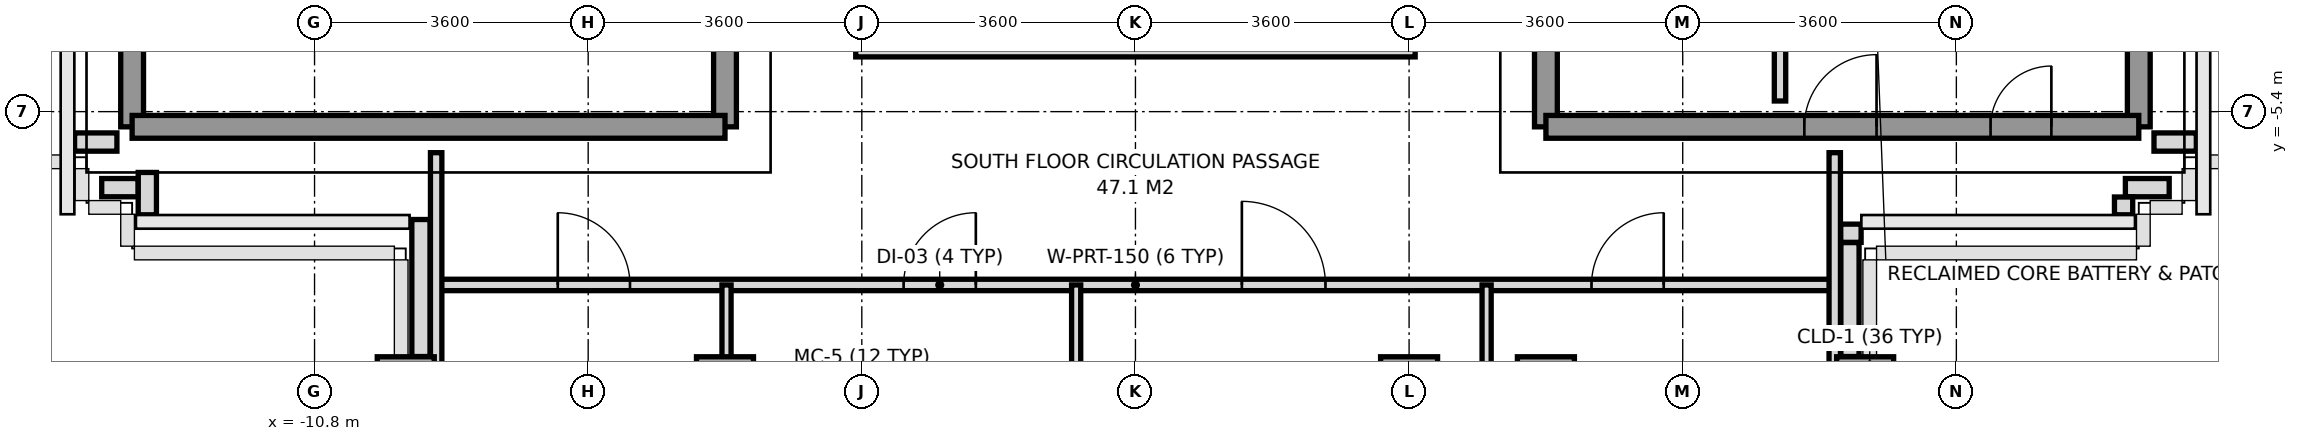
"""IFC4 building model, lengths in metres.
Left out: names, types, materials, properties, quantities, classifications, styles, units other than length and angle.
Written with IfcOpenShell. Run it as: python <this file> out.ifc"""

import sys

from ifc_helpers import new_model, si_unit, direction, frame, frame_2d, origin, origin_2d, place, context, subcontext, project, spatial, rectangle, extrude, source, transform, mapped, element, fill, save


model = new_model("IFC4")
c1 = context("Model", 3, precision=1e-05, world=origin(), true_north=direction((0.0, 1.0)))
c2 = subcontext(c1, "Body", "Model", "MODEL_VIEW")
j1 = project(units=[si_unit("LENGTHUNIT", "METRE"), si_unit("PLANEANGLEUNIT", "RADIAN")], contexts=[c1])
p1 = place(None, origin())
s1 = spatial("IfcSite", under=j1, at=p1, CompositionType="ELEMENT")
p2 = place(p1, origin())
s2 = spatial("IfcBuilding", under=s1, at=p2, CompositionType="ELEMENT")
p3 = place(p2, frame((0.0, 0.0, 265.2)))
s3 = spatial("IfcBuildingStorey", under=s2, at=p3, CompositionType="ELEMENT", Elevation=265.2)
m1 = source(origin(), c2, "Body", "SweptSolid", [
    extrude(rectangle(XDim=0.75, YDim=0.75, at=origin_2d()), origin(), (0.0, 0.0, 1.0), 3.01),
])
for number, where, z_axis, x_axis in (
    (1, (-9.6, -9.0, 0.0), (0.0, 0.0, 1.0), (1.0, 0.0, 0.0)),
    (2, (-5.4, -9.0, 0.0), (0.0, 0.0, 1.0), (1.0, 0.0, 0.0)),
    (3, (-3.6, -9.0, 0.0), (0.0, 0.0, 1.0), (1.0, 0.0, 0.0)),
    (4, (3.6, -9.0, 0.0), (0.0, 0.0, 1.0), (1.0, 0.0, 0.0)),
    (5, (5.4, -9.0, 0.0), (0.0, 0.0, 1.0), (1.0, 0.0, 0.0)),
    (6, (9.6, -9.0, 0.0), (0.0, 0.0, 1.0), (1.0, 0.0, 0.0)),
):
    element("IfcColumn", number, at=place(p3, frame(where, z_axis=z_axis, x_axis=x_axis)), inside=s3, PredefinedType="COLUMN", context=c2, shape_type="MappedRepresentation", body=[
        mapped(m1, transform((0.0, 0.0, 0.0), x_axis=(1.0, 0.0, 0.0), y_axis=(0.0, 1.0, 0.0), z_axis=(0.0, 0.0, 1.0), scale=1.0)),
    ])
p4 = place(p3, frame((13.957, -5.8, 0.0), z_axis=(0.0, 0.0, 1.0), x_axis=(-1.0, 0.0, 0.0)))
e7 = element("IfcWall", 7, at=p4, inside=s3, PredefinedType="PARAPET", context=c2, shape_type="SweptSolid", body=[
    extrude(rectangle(XDim=0.557, YDim=0.24, at=frame_2d((0.279, 0.0))), origin(), (0.0, 0.0, 1.0), 1.15),
])
p5 = place(p3, frame((13.6, -6.4, 0.0), z_axis=(0.0, 0.0, 1.0), x_axis=(-1.0, 0.0, 0.0)))
e8 = element("IfcWall", 8, at=p5, inside=s3, PredefinedType="PARAPET", context=c2, shape_type="SweptSolid", body=[
    extrude(rectangle(XDim=0.576, YDim=0.24, at=frame_2d((0.288, 0.0))), origin(), (0.0, 0.0, 1.0), 1.15),
])
p6 = place(p3, frame((13.0, -6.523, 0.0), z_axis=(0.0, 0.0, 1.0), x_axis=(0.0, -1.0, 0.0)))
e9 = element("IfcWall", 9, at=p6, inside=s3, PredefinedType="PARAPET", context=c2, shape_type="SweptSolid", body=[
    extrude(rectangle(XDim=0.234, YDim=0.24, at=frame_2d((0.117, 0.0))), origin(), (0.0, 0.0, 1.0), 1.15),
])
p7 = place(p3, frame((9.547, -7.0, 0.0), z_axis=(0.0, 0.0, 1.0), x_axis=(-1.0, 0.0, 0.0)))
e10 = element("IfcWall", 10, at=p7, inside=s3, PredefinedType="PARAPET", context=c2, shape_type="SweptSolid", body=[
    extrude(rectangle(XDim=0.269, YDim=0.24, at=frame_2d((0.135, 0.0))), origin(), (0.0, 0.0, 1.0), 1.15),
])
p8 = place(p3, frame((9.4, -7.123, 0.0), z_axis=(0.0, 0.0, 1.0), x_axis=(0.0, -1.0, 0.0)))
e11 = element("IfcWall", 11, at=p8, inside=s3, PredefinedType="PARAPET", context=c2, shape_type="SweptSolid", body=[
    extrude(rectangle(XDim=1.499, YDim=0.24, at=frame_2d((0.75, 0.0))), origin(), (0.0, 0.0, 1.0), 1.15),
])
p9 = place(p3, frame((-9.4, -8.622, 0.0), z_axis=(0.0, 0.0, 1.0), x_axis=(0.0, 1.0, 0.0)))
e12 = element("IfcWall", 12, at=p9, inside=s3, PredefinedType="PARAPET", context=c2, shape_type="SweptSolid", body=[
    extrude(rectangle(XDim=1.803, YDim=0.24, at=frame_2d((0.901, 0.0))), origin(), (0.0, 0.0, 1.0), 1.15),
])
p10 = place(p3, frame((-13.0, -6.757, 0.0), z_axis=(0.0, 0.0, 1.0), x_axis=(0.0, 1.0, 0.0)))
e13 = element("IfcWall", 13, at=p10, inside=s3, PredefinedType="PARAPET", context=c2, shape_type="SweptSolid", body=[
    extrude(rectangle(XDim=0.557, YDim=0.24, at=frame_2d((0.279, 0.0))), origin(), (0.0, 0.0, 1.0), 1.15),
])
p11 = place(p3, frame((-13.123, -6.4, 0.0), z_axis=(0.0, 0.0, 1.0), x_axis=(-1.0, 0.0, 0.0)))
e14 = element("IfcWall", 14, at=p11, inside=s3, PredefinedType="PARAPET", context=c2, shape_type="SweptSolid", body=[
    extrude(rectangle(XDim=0.477, YDim=0.24, at=frame_2d((0.239, 0.0))), origin(), (0.0, 0.0, 1.0), 1.15),
])
p12 = place(p3, frame((-13.4, -5.8, 0.0), z_axis=(0.0, 0.0, 1.0), x_axis=(-1.0, 0.0, 0.0)))
e15 = element("IfcWall", 15, at=p12, inside=s3, PredefinedType="PARAPET", context=c2, shape_type="SweptSolid", body=[
    extrude(rectangle(XDim=0.557, YDim=0.24, at=frame_2d((0.279, 0.0))), origin(), (0.0, 0.0, 1.0), 1.15),
])
p13 = place(p3, frame((-13.2, -5.6, 0.0), z_axis=(0.0, 0.0, 1.0), x_axis=(0.0, 1.0, 0.0)))
e16 = element("IfcWall", 16, at=p13, inside=s3, PredefinedType="SHEAR", context=c2, shape_type="SweptSolid", body=[
    extrude(rectangle(XDim=11.2, YDim=0.3, at=frame_2d((5.6, 0.0))), origin(), (0.0, 0.0, 1.0), 3.01),
])
p14 = place(p3, frame((-5.4, -5.6, 0.0), z_axis=(0.0, 0.0, 1.0), x_axis=(0.0, 1.0, 0.0)))
e17 = element("IfcWall", 17, at=p14, inside=s3, PredefinedType="SHEAR", context=c2, shape_type="SweptSolid", body=[
    extrude(rectangle(XDim=12.5, YDim=0.3, at=frame_2d((6.25, 0.0))), origin(), (0.0, 0.0, 1.0), 3.01),
])
p15 = place(p14, frame((4.55, 0.0, 0.0)))
e18 = element("IfcOpeningElement", 18, at=p15, cuts=e17, PredefinedType="OPENING", context=c2, shape_type="SweptSolid", body=[
    extrude(rectangle(XDim=1.2, YDim=2.2, at=frame_2d((0.6, 1.1))), frame((0.0, 0.16, 0.0), z_axis=(0.0, -1.0, 0.0), x_axis=(1.0, 0.0, 0.0)), (0.0, 0.0, 1.0), 0.32),
])
p16 = place(p14, frame((10.45, 0.0, 0.0)))
e19 = element("IfcOpeningElement", 19, at=p16, cuts=e17, PredefinedType="OPENING", context=c2, shape_type="SweptSolid", body=[
    extrude(rectangle(XDim=1.2, YDim=2.2, at=frame_2d((0.6, 1.1))), frame((0.0, 0.16, 0.0), z_axis=(0.0, -1.0, 0.0), x_axis=(1.0, 0.0, 0.0)), (0.0, 0.0, 1.0), 0.32),
])
p17 = place(p3, frame((-13.2, -5.6, 0.0), z_axis=(0.0, 0.0, 1.0), x_axis=(1.0, 0.0, 0.0)))
e20 = element("IfcWall", 20, at=p17, inside=s3, PredefinedType="SHEAR", context=c2, shape_type="SweptSolid", body=[
    extrude(rectangle(XDim=7.8, YDim=0.3, at=frame_2d((3.9, 0.0))), origin(), (0.0, 0.0, 1.0), 3.01),
])
p18 = place(p3, frame((13.2, -5.6, 0.0), z_axis=(0.0, 0.0, 1.0), x_axis=(0.0, 1.0, 0.0)))
e21 = element("IfcWall", 21, at=p18, inside=s3, PredefinedType="SHEAR", context=c2, shape_type="SweptSolid", body=[
    extrude(rectangle(XDim=11.2, YDim=0.3, at=frame_2d((5.6, 0.0))), origin(), (0.0, 0.0, 1.0), 3.01),
])
p19 = place(p3, frame((5.4, -5.6, 0.0), z_axis=(0.0, 0.0, 1.0), x_axis=(0.0, 1.0, 0.0)))
e22 = element("IfcWall", 22, at=p19, inside=s3, PredefinedType="SHEAR", context=c2, shape_type="SweptSolid", body=[
    extrude(rectangle(XDim=12.5, YDim=0.3, at=frame_2d((6.25, 0.0))), origin(), (0.0, 0.0, 1.0), 3.01),
])
p20 = place(p19, frame((4.55, 0.0, 0.0)))
e23 = element("IfcOpeningElement", 23, at=p20, cuts=e22, PredefinedType="OPENING", context=c2, shape_type="SweptSolid", body=[
    extrude(rectangle(XDim=1.2, YDim=2.2, at=frame_2d((0.6, 1.1))), frame((0.0, 0.16, 0.0), z_axis=(0.0, -1.0, 0.0), x_axis=(1.0, 0.0, 0.0)), (0.0, 0.0, 1.0), 0.32),
])
p21 = place(p19, frame((10.45, 0.0, 0.0)))
e24 = element("IfcOpeningElement", 24, at=p21, cuts=e22, PredefinedType="OPENING", context=c2, shape_type="SweptSolid", body=[
    extrude(rectangle(XDim=1.2, YDim=2.2, at=frame_2d((0.6, 1.1))), frame((0.0, 0.16, 0.0), z_axis=(0.0, -1.0, 0.0), x_axis=(1.0, 0.0, 0.0)), (0.0, 0.0, 1.0), 0.32),
])
p22 = place(p19, frame((7.88, 0.0, 0.0)))
e25 = element("IfcOpeningElement", 25, at=p22, cuts=e22, PredefinedType="OPENING", context=c2, shape_type="SweptSolid", body=[
    extrude(rectangle(XDim=0.8, YDim=2.1, at=frame_2d((0.4, 1.05))), frame((0.0, 0.16, 0.0), z_axis=(0.0, -1.0, 0.0), x_axis=(1.0, 0.0, 0.0)), (0.0, 0.0, 1.0), 0.32),
])
p23 = place(p3, frame((5.4, -5.6, 0.0), z_axis=(0.0, 0.0, 1.0), x_axis=(1.0, 0.0, 0.0)))
e26 = element("IfcWall", 26, at=p23, inside=s3, PredefinedType="SHEAR", context=c2, shape_type="SweptSolid", body=[
    extrude(rectangle(XDim=7.8, YDim=0.3, at=frame_2d((3.9, 0.0))), origin(), (0.0, 0.0, 1.0), 3.01),
])
p24 = place(p23, frame((5.85, 0.0, 0.0)))
e27 = element("IfcOpeningElement", 27, at=p24, cuts=e26, PredefinedType="OPENING", context=c2, shape_type="SweptSolid", body=[
    extrude(rectangle(XDim=0.8, YDim=2.1, at=frame_2d((0.4, 1.05))), frame((0.0, 0.16, 0.0), z_axis=(0.0, -1.0, 0.0), x_axis=(1.0, 0.0, 0.0)), (0.0, 0.0, 1.0), 0.32),
])
p25 = place(p23, frame((3.4, 0.0, 0.0)))
e28 = element("IfcOpeningElement", 28, at=p25, cuts=e26, PredefinedType="OPENING", context=c2, shape_type="SweptSolid", body=[
    extrude(rectangle(XDim=0.95, YDim=2.15, at=frame_2d((0.475, 1.075))), frame((0.0, 0.16, 0.0), z_axis=(0.0, -1.0, 0.0), x_axis=(1.0, 0.0, 0.0)), (0.0, 0.0, 1.0), 0.32),
])
p26 = place(p3, frame((8.48, -5.26, 0.0), z_axis=(0.0, 0.0, 1.0), x_axis=(0.0, 1.0, 0.0)))
e29 = element("IfcWall", 29, at=p26, inside=s3, PredefinedType="PARTITIONING", context=c2, shape_type="SweptSolid", body=[
    extrude(rectangle(XDim=2.94, YDim=0.15, at=frame_2d((1.47, 0.0))), origin(), (0.0, 0.0, 1.0), 3.01),
])
p27 = place(p3, frame((-9.2, -7.68, 0.0), z_axis=(0.0, 0.0, 1.0), x_axis=(1.0, 0.0, 0.0)))
e30 = element("IfcWall", 30, at=p27, inside=s3, PredefinedType="PARTITIONING", context=c2, shape_type="SweptSolid", body=[
    extrude(rectangle(XDim=18.4, YDim=0.15, at=frame_2d((9.2, 0.0))), origin(), (0.0, 0.0, 1.0), 2.57),
])
p28 = place(p27, frame((1.6, 0.0, 0.0)))
e31 = element("IfcOpeningElement", 31, at=p28, cuts=e30, PredefinedType="OPENING", context=c2, shape_type="SweptSolid", body=[
    extrude(rectangle(XDim=0.95, YDim=2.15, at=frame_2d((0.475, 1.075))), frame((0.0, 0.085, 0.0), z_axis=(0.0, -1.0, 0.0), x_axis=(1.0, 0.0, 0.0)), (0.0, 0.0, 1.0), 0.17),
])
p29 = place(p27, frame((6.15, 0.0, 0.0)))
e32 = element("IfcOpeningElement", 32, at=p29, cuts=e30, PredefinedType="OPENING", context=c2, shape_type="SweptSolid", body=[
    extrude(rectangle(XDim=0.95, YDim=2.15, at=frame_2d((0.475, 1.075))), frame((0.0, 0.085, 0.0), z_axis=(0.0, -1.0, 0.0), x_axis=(1.0, 0.0, 0.0)), (0.0, 0.0, 1.0), 0.17),
])
p30 = place(p27, frame((10.6, 0.0, 0.0)))
e33 = element("IfcOpeningElement", 33, at=p30, cuts=e30, PredefinedType="OPENING", context=c2, shape_type="SweptSolid", body=[
    extrude(rectangle(XDim=1.1, YDim=2.2, at=frame_2d((0.55, 1.1))), frame((0.0, 0.085, 0.0), z_axis=(0.0, -1.0, 0.0), x_axis=(1.0, 0.0, 0.0)), (0.0, 0.0, 1.0), 0.17),
])
p31 = place(p27, frame((15.2, 0.0, 0.0)))
e34 = element("IfcOpeningElement", 34, at=p31, cuts=e30, PredefinedType="OPENING", context=c2, shape_type="SweptSolid", body=[
    extrude(rectangle(XDim=0.95, YDim=2.15, at=frame_2d((0.475, 1.075))), frame((0.0, 0.085, 0.0), z_axis=(0.0, -1.0, 0.0), x_axis=(1.0, 0.0, 0.0)), (0.0, 0.0, 1.0), 0.17),
])
for number, where, z_axis, x_axis in (
    (35, (-9.2, -10.28, 0.0), (0.0, 0.0, 1.0), (0.0, 1.0, 0.0)),
    (36, (9.2, -10.28, 0.0), (0.0, 0.0, 1.0), (0.0, 1.0, 0.0)),
):
    element("IfcWall", number, at=place(p3, frame(where, z_axis=z_axis, x_axis=x_axis)), inside=s3, PredefinedType="PARTITIONING", context=c2, shape_type="SweptSolid", body=[
        extrude(rectangle(XDim=4.34, YDim=0.15, at=frame_2d((2.17, 0.0))), origin(), (0.0, 0.0, 1.0), 2.61),
    ])
for number, where, z_axis, x_axis in (
    (37, (-5.38, -19.25, 0.0), (0.0, 0.0, 1.0), (0.0, 1.0, 0.0)),
    (38, (-0.78, -19.25, 0.0), (0.0, 0.0, 1.0), (0.0, 1.0, 0.0)),
    (39, (4.62, -19.25, 0.0), (0.0, 0.0, 1.0), (0.0, 1.0, 0.0)),
):
    element("IfcWall", number, at=place(p3, frame(where, z_axis=z_axis, x_axis=x_axis)), inside=s3, PredefinedType="PARTITIONING", context=c2, shape_type="SweptSolid", body=[
        extrude(rectangle(XDim=11.57, YDim=0.12, at=frame_2d((5.785, 0.0))), origin(), (0.0, 0.0, 1.0), 2.61),
    ])
p32 = place(p3, frame((-3.68, -4.56, 0.0), z_axis=(0.0, 0.0, 1.0), x_axis=(1.0, 0.0, 0.0)))
e40 = element("IfcWall", 40, at=p32, inside=s3, PredefinedType="PARAPET", context=c2, shape_type="SweptSolid", body=[
    extrude(rectangle(XDim=7.36, YDim=0.24, at=frame_2d((3.68, 0.0))), origin(), (0.0, 0.0, 1.0), 1.15),
])
m2 = source(origin(), c2, "Body", "SweptSolid", [
    extrude(rectangle(XDim=0.8, YDim=2.1, at=frame_2d((0.4, 1.05))), frame((0.0, 0.025, 0.0), z_axis=(0.0, -1.0, 0.0), x_axis=(1.0, 0.0, 0.0)), (0.0, 0.0, 1.0), 0.05),
])
p33 = place(p24, origin())
e41 = element("IfcDoor", 41, at=p33, inside=s3, OperationType="SINGLE_SWING_RIGHT", PredefinedType="DOOR", context=c2, shape_type="MappedRepresentation", body=[
    mapped(m2, transform((0.0, 0.0, 0.0), x_axis=(1.0, 0.0, 0.0), y_axis=(0.0, 1.0, 0.0), z_axis=(0.0, 0.0, 1.0), scale=1.0)),
])
fill(e27, e41)
m3 = source(origin(), c2, "Body", "SweptSolid", [
    extrude(rectangle(XDim=0.95, YDim=2.15, at=frame_2d((0.475, 1.075))), frame((0.0, 0.025, 0.0), z_axis=(0.0, -1.0, 0.0), x_axis=(1.0, 0.0, 0.0)), (0.0, 0.0, 1.0), 0.05),
])
p34 = place(p25, origin())
e42 = element("IfcDoor", 42, at=p34, inside=s3, OperationType="SINGLE_SWING_RIGHT", PredefinedType="DOOR", context=c2, shape_type="MappedRepresentation", body=[
    mapped(m3, transform((0.0, 0.0, 0.0), x_axis=(1.0, 0.0, 0.0), y_axis=(0.0, 1.0, 0.0), z_axis=(0.0, 0.0, 1.0), scale=1.0)),
])
fill(e28, e42)
p35 = place(p28, origin())
e43 = element("IfcDoor", 43, at=p35, inside=s3, OperationType="SINGLE_SWING_LEFT", PredefinedType="DOOR", context=c2, shape_type="MappedRepresentation", body=[
    mapped(m3, transform((0.0, 0.0, 0.0), x_axis=(1.0, 0.0, 0.0), y_axis=(0.0, 1.0, 0.0), z_axis=(0.0, 0.0, 1.0), scale=1.0)),
])
fill(e31, e43)
p36 = place(p29, origin())
e44 = element("IfcDoor", 44, at=p36, inside=s3, OperationType="SINGLE_SWING_RIGHT", PredefinedType="DOOR", context=c2, shape_type="MappedRepresentation", body=[
    mapped(m3, transform((0.0, 0.0, 0.0), x_axis=(1.0, 0.0, 0.0), y_axis=(0.0, 1.0, 0.0), z_axis=(0.0, 0.0, 1.0), scale=1.0)),
])
fill(e32, e44)
m4 = source(origin(), c2, "Body", "SweptSolid", [
    extrude(rectangle(XDim=1.1, YDim=2.2, at=frame_2d((0.55, 1.1))), frame((0.0, 0.025, 0.0), z_axis=(0.0, -1.0, 0.0), x_axis=(1.0, 0.0, 0.0)), (0.0, 0.0, 1.0), 0.05),
])
p37 = place(p30, origin())
e45 = element("IfcDoor", 45, at=p37, inside=s3, OperationType="SINGLE_SWING_LEFT", PredefinedType="DOOR", context=c2, shape_type="MappedRepresentation", body=[
    mapped(m4, transform((0.0, 0.0, 0.0), x_axis=(1.0, 0.0, 0.0), y_axis=(0.0, 1.0, 0.0), z_axis=(0.0, 0.0, 1.0), scale=1.0)),
])
fill(e33, e45)
p38 = place(p31, origin())
e46 = element("IfcDoor", 46, at=p38, inside=s3, OperationType="SINGLE_SWING_RIGHT", PredefinedType="DOOR", context=c2, shape_type="MappedRepresentation", body=[
    mapped(m3, transform((0.0, 0.0, 0.0), x_axis=(1.0, 0.0, 0.0), y_axis=(0.0, 1.0, 0.0), z_axis=(0.0, 0.0, 1.0), scale=1.0)),
])
fill(e34, e46)
save(model, sys.argv[1])
